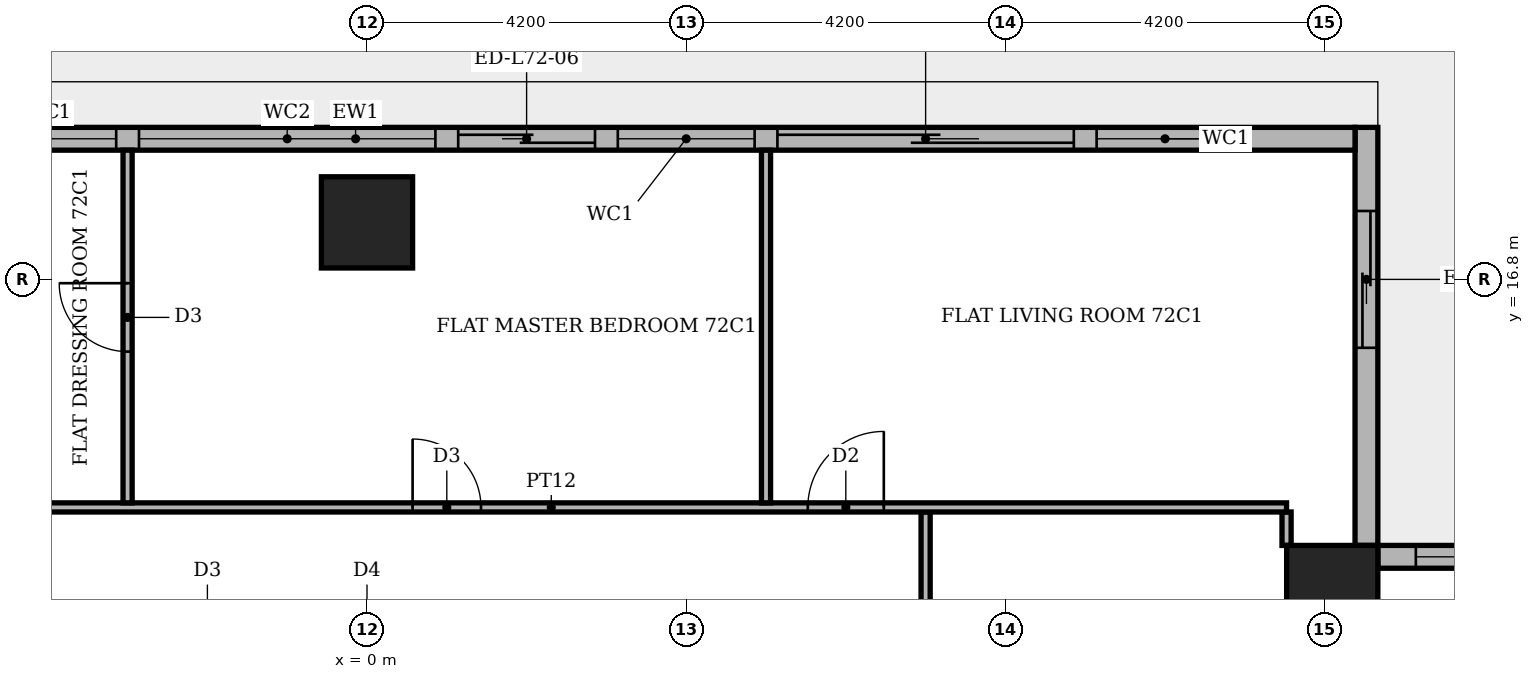
"""IFC4 building model, lengths in metres.
Left out: names, types, materials, properties, quantities, classifications, styles, units other than length and angle.
Written with IfcOpenShell. Run it as: python <this file> out.ifc"""

import sys

from ifc_helpers import new_model, si_unit, direction, frame, frame_2d, origin, origin_2d, place, context, subcontext, project, spatial, rectangle, extrude, element, fill, save


model = new_model("IFC4")
c1 = context("Model", 3, precision=1e-05, world=origin(), true_north=direction((0.0, 1.0)))
c2 = subcontext(c1, "Body", "Model", "MODEL_VIEW")
j1 = project(units=[si_unit("LENGTHUNIT", "METRE"), si_unit("PLANEANGLEUNIT", "RADIAN")], contexts=[c1])
p1 = place(None, origin())
s1 = spatial("IfcSite", under=j1, at=p1, CompositionType="ELEMENT")
p2 = place(p1, origin())
s2 = spatial("IfcBuilding", under=s1, at=p2, CompositionType="ELEMENT")
p3 = place(p2, frame((0.0, 0.0, 300.6)))
s3 = spatial("IfcBuildingStorey", under=s2, at=p3, CompositionType="ELEMENT", Elevation=300.6)
for number, where, z_axis, x_axis in (
    (1, (12.7, 12.7, -0.35), (0.0, 0.0, 1.0), (1.0, 0.0, 0.0)),
    (2, (0.0, 17.55, -0.35), (0.0, 0.0, 1.0), (1.0, 0.0, 0.0)),
):
    element("IfcColumn", number, at=place(p3, frame(where, z_axis=z_axis, x_axis=x_axis)), inside=s3, PredefinedType="COLUMN", context=c2, shape_type="SweptSolid", body=[
        extrude(rectangle(XDim=1.2, YDim=1.2, at=origin_2d()), origin(), (0.0, 0.0, 1.0), 4.25),
    ])
p4 = place(p3, frame((18.5, 13.15, 0.0), z_axis=(0.0, 0.0, 1.0), x_axis=(-1.0, 0.0, 0.0)))
e3 = element("IfcWall", 3, at=p4, inside=s3, PredefinedType="STANDARD", context=c2, shape_type="SweptSolid", body=[
    extrude(rectangle(XDim=5.2, YDim=0.3, at=frame_2d((2.6, 0.0))), origin(), (0.0, 0.0, 1.0), 3.55),
])
p5 = place(p4, frame((0.8, 0.0, 0.6)))
e4 = element("IfcOpeningElement", 4, at=p5, cuts=e3, PredefinedType="OPENING", context=c2, shape_type="SweptSolid", body=[
    extrude(rectangle(XDim=3.9, YDim=2.4, at=frame_2d((1.95, 1.2))), frame((0.0, 0.16, 0.0), z_axis=(0.0, -1.0, 0.0), x_axis=(1.0, 0.0, 0.0)), (0.0, 0.0, 1.0), 0.32),
])
p6 = place(p3, frame((13.15, 13.3, 0.0), z_axis=(0.0, 0.0, 1.0), x_axis=(0.0, 1.0, 0.0)))
e5 = element("IfcWall", 5, at=p6, inside=s3, PredefinedType="STANDARD", context=c2, shape_type="SweptSolid", body=[
    extrude(rectangle(XDim=5.5, YDim=0.3, at=frame_2d((2.75, 0.0))), origin(), (0.0, 0.0, 1.0), 3.55),
])
p7 = place(p6, frame((2.6, 0.0, 0.0)))
e6 = element("IfcOpeningElement", 6, at=p7, cuts=e5, PredefinedType="OPENING", context=c2, shape_type="SweptSolid", body=[
    extrude(rectangle(XDim=1.8, YDim=2.4, at=frame_2d((0.9, 1.2))), frame((0.0, 0.16, 0.0), z_axis=(0.0, -1.0, 0.0), x_axis=(1.0, 0.0, 0.0)), (0.0, 0.0, 1.0), 0.32),
])
p8 = place(p3, frame((13.0, 18.65, 0.0), z_axis=(0.0, 0.0, 1.0), x_axis=(-1.0, 0.0, 0.0)))
e7 = element("IfcWall", 7, at=p8, inside=s3, PredefinedType="STANDARD", context=c2, shape_type="SweptSolid", body=[
    extrude(rectangle(XDim=26.3, YDim=0.3, at=frame_2d((13.15, 0.0))), origin(), (0.0, 0.0, 1.0), 3.55),
])
p9 = place(p8, frame((1.6, 0.0, 0.6)))
e8 = element("IfcOpeningElement", 8, at=p9, cuts=e7, PredefinedType="OPENING", context=c2, shape_type="SweptSolid", body=[
    extrude(rectangle(XDim=1.8, YDim=2.4, at=frame_2d((0.9, 1.2))), frame((0.0, 0.16, 0.0), z_axis=(0.0, -1.0, 0.0), x_axis=(1.0, 0.0, 0.0)), (0.0, 0.0, 1.0), 0.32),
])
p10 = place(p8, frame((3.7, 0.0, 0.0)))
e9 = element("IfcOpeningElement", 9, at=p10, cuts=e7, PredefinedType="OPENING", context=c2, shape_type="SweptSolid", body=[
    extrude(rectangle(XDim=3.9, YDim=2.4, at=frame_2d((1.95, 1.2))), frame((0.0, 0.16, 0.0), z_axis=(0.0, -1.0, 0.0), x_axis=(1.0, 0.0, 0.0)), (0.0, 0.0, 1.0), 0.32),
])
p11 = place(p8, frame((7.9, 0.0, 0.6)))
e10 = element("IfcOpeningElement", 10, at=p11, cuts=e7, PredefinedType="OPENING", context=c2, shape_type="SweptSolid", body=[
    extrude(rectangle(XDim=1.8, YDim=2.4, at=frame_2d((0.9, 1.2))), frame((0.0, 0.16, 0.0), z_axis=(0.0, -1.0, 0.0), x_axis=(1.0, 0.0, 0.0)), (0.0, 0.0, 1.0), 0.32),
])
p12 = place(p8, frame((10.0, 0.0, 0.0)))
e11 = element("IfcOpeningElement", 11, at=p12, cuts=e7, PredefinedType="OPENING", context=c2, shape_type="SweptSolid", body=[
    extrude(rectangle(XDim=1.8, YDim=2.4, at=frame_2d((0.9, 1.2))), frame((0.0, 0.16, 0.0), z_axis=(0.0, -1.0, 0.0), x_axis=(1.0, 0.0, 0.0)), (0.0, 0.0, 1.0), 0.32),
])
p13 = place(p8, frame((12.1, 0.0, 0.6)))
e12 = element("IfcOpeningElement", 12, at=p13, cuts=e7, PredefinedType="OPENING", context=c2, shape_type="SweptSolid", body=[
    extrude(rectangle(XDim=3.9, YDim=2.4, at=frame_2d((1.95, 1.2))), frame((0.0, 0.16, 0.0), z_axis=(0.0, -1.0, 0.0), x_axis=(1.0, 0.0, 0.0)), (0.0, 0.0, 1.0), 0.32),
])
p14 = place(p8, frame((16.3, 0.0, 0.6)))
e13 = element("IfcOpeningElement", 13, at=p14, cuts=e7, PredefinedType="OPENING", context=c2, shape_type="SweptSolid", body=[
    extrude(rectangle(XDim=1.8, YDim=2.4, at=frame_2d((0.9, 1.2))), frame((0.0, 0.16, 0.0), z_axis=(0.0, -1.0, 0.0), x_axis=(1.0, 0.0, 0.0)), (0.0, 0.0, 1.0), 0.32),
])
p15 = place(p8, frame((18.4, 0.0, 0.6)))
e14 = element("IfcOpeningElement", 14, at=p15, cuts=e7, PredefinedType="OPENING", context=c2, shape_type="SweptSolid", body=[
    extrude(rectangle(XDim=1.8, YDim=2.4, at=frame_2d((0.9, 1.2))), frame((0.0, 0.16, 0.0), z_axis=(0.0, -1.0, 0.0), x_axis=(1.0, 0.0, 0.0)), (0.0, 0.0, 1.0), 0.32),
])
p16 = place(p8, frame((20.5, 0.0, 0.6)))
e15 = element("IfcOpeningElement", 15, at=p16, cuts=e7, PredefinedType="OPENING", context=c2, shape_type="SweptSolid", body=[
    extrude(rectangle(XDim=3.9, YDim=2.4, at=frame_2d((1.95, 1.2))), frame((0.0, 0.16, 0.0), z_axis=(0.0, -1.0, 0.0), x_axis=(1.0, 0.0, 0.0)), (0.0, 0.0, 1.0), 0.32),
])
p17 = place(p3, frame((7.35, 7.45, 0.0), z_axis=(0.0, 0.0, 1.0), x_axis=(0.0, 1.0, 0.0)))
e16 = element("IfcWall", 16, at=p17, inside=s3, PredefinedType="PARTITIONING", context=c2, shape_type="SweptSolid", body=[
    extrude(rectangle(XDim=6.29, YDim=0.12, at=frame_2d((3.145, 0.0))), origin(), (0.0, 0.0, 1.0), 3.55),
])
p18 = place(p17, frame((2.675, 0.0, 0.0)))
e17 = element("IfcOpeningElement", 17, at=p18, cuts=e16, PredefinedType="OPENING", context=c2, shape_type="SweptSolid", body=[
    extrude(rectangle(XDim=0.9, YDim=2.1, at=frame_2d((0.45, 1.05))), frame((0.0, 0.07, 0.0), z_axis=(0.0, -1.0, 0.0), x_axis=(1.0, 0.0, 0.0)), (0.0, 0.0, 1.0), 0.14),
])
p19 = place(p3, frame((12.099, 13.3, 0.0), z_axis=(0.0, 0.0, 1.0), x_axis=(0.0, 1.0, 0.0)))
e18 = element("IfcWall", 18, at=p19, inside=s3, PredefinedType="PARTITIONING", context=c2, shape_type="SweptSolid", body=[
    extrude(rectangle(XDim=0.44, YDim=0.12, at=frame_2d((0.22, 0.0))), origin(), (0.0, 0.0, 1.0), 3.55),
])
p20 = place(p3, frame((-7.25, 13.8, 0.0), z_axis=(0.0, 0.0, 1.0), x_axis=(1.0, 0.0, 0.0)))
e19 = element("IfcWall", 19, at=p20, inside=s3, PredefinedType="PARTITIONING", context=c2, shape_type="SweptSolid", body=[
    extrude(rectangle(XDim=19.349, YDim=0.12, at=frame_2d((9.675, 0.0))), origin(), (0.0, 0.0, 1.0), 3.55),
])
p21 = place(p20, frame((13.05, 0.0, 0.0)))
e20 = element("IfcOpeningElement", 20, at=p21, cuts=e19, PredefinedType="OPENING", context=c2, shape_type="SweptSolid", body=[
    extrude(rectangle(XDim=1.0, YDim=2.1, at=frame_2d((0.5, 1.05))), frame((0.0, 0.07, 0.0), z_axis=(0.0, -1.0, 0.0), x_axis=(1.0, 0.0, 0.0)), (0.0, 0.0, 1.0), 0.14),
])
p22 = place(p20, frame((7.85, 0.0, 0.0)))
e21 = element("IfcOpeningElement", 21, at=p22, cuts=e19, PredefinedType="OPENING", context=c2, shape_type="SweptSolid", body=[
    extrude(rectangle(XDim=0.9, YDim=2.1, at=frame_2d((0.45, 1.05))), frame((0.0, 0.07, 0.0), z_axis=(0.0, -1.0, 0.0), x_axis=(1.0, 0.0, 0.0)), (0.0, 0.0, 1.0), 0.14),
])
p23 = place(p3, frame((-3.15, 13.86, 0.0), z_axis=(0.0, 0.0, 1.0), x_axis=(0.0, 1.0, 0.0)))
e22 = element("IfcWall", 22, at=p23, inside=s3, PredefinedType="PARTITIONING", context=c2, shape_type="SweptSolid", body=[
    extrude(rectangle(XDim=4.64, YDim=0.12, at=frame_2d((2.32, 0.0))), origin(), (0.0, 0.0, 1.0), 3.55),
])
p24 = place(p23, frame((1.99, 0.0, 0.0)))
e23 = element("IfcOpeningElement", 23, at=p24, cuts=e22, PredefinedType="OPENING", context=c2, shape_type="SweptSolid", body=[
    extrude(rectangle(XDim=0.9, YDim=2.1, at=frame_2d((0.45, 1.05))), frame((0.0, 0.07, 0.0), z_axis=(0.0, -1.0, 0.0), x_axis=(1.0, 0.0, 0.0)), (0.0, 0.0, 1.0), 0.14),
])
p25 = place(p3, frame((5.25, 13.86, 0.0), z_axis=(0.0, 0.0, 1.0), x_axis=(0.0, 1.0, 0.0)))
e24 = element("IfcWall", 24, at=p25, inside=s3, PredefinedType="PARTITIONING", context=c2, shape_type="SweptSolid", body=[
    extrude(rectangle(XDim=4.64, YDim=0.12, at=frame_2d((2.32, 0.0))), origin(), (0.0, 0.0, 1.0), 3.55),
])
p26 = place(p5, origin())
e25 = element("IfcWindow", 25, at=p26, inside=s3, PartitioningType="SINGLE_PANEL", PredefinedType="WINDOW", context=c2, shape_type="SweptSolid", body=[
    extrude(rectangle(XDim=3.9, YDim=2.4, at=frame_2d((1.95, 1.2))), frame((0.0, 0.03, 0.0), z_axis=(0.0, -1.0, 0.0), x_axis=(1.0, 0.0, 0.0)), (0.0, 0.0, 1.0), 0.06),
])
fill(e4, e25)
p27 = place(p7, origin())
e26 = element("IfcDoor", 26, at=p27, inside=s3, OperationType="SLIDING_TO_LEFT", PredefinedType="DOOR", context=c2, shape_type="SweptSolid", body=[
    extrude(rectangle(XDim=1.8, YDim=2.4, at=frame_2d((0.9, 1.2))), frame((0.0, 0.025, 0.0), z_axis=(0.0, -1.0, 0.0), x_axis=(1.0, 0.0, 0.0)), (0.0, 0.0, 1.0), 0.05),
])
fill(e6, e26)
p28 = place(p9, origin())
e27 = element("IfcWindow", 27, at=p28, inside=s3, PartitioningType="SINGLE_PANEL", PredefinedType="WINDOW", context=c2, shape_type="SweptSolid", body=[
    extrude(rectangle(XDim=1.8, YDim=2.4, at=frame_2d((0.9, 1.2))), frame((0.0, 0.03, 0.0), z_axis=(0.0, -1.0, 0.0), x_axis=(1.0, 0.0, 0.0)), (0.0, 0.0, 1.0), 0.06),
])
fill(e8, e27)
p29 = place(p10, origin())
e28 = element("IfcDoor", 28, at=p29, inside=s3, OperationType="SLIDING_TO_LEFT", PredefinedType="DOOR", context=c2, shape_type="SweptSolid", body=[
    extrude(rectangle(XDim=3.9, YDim=2.4, at=frame_2d((1.95, 1.2))), frame((0.0, 0.025, 0.0), z_axis=(0.0, -1.0, 0.0), x_axis=(1.0, 0.0, 0.0)), (0.0, 0.0, 1.0), 0.05),
])
fill(e9, e28)
p30 = place(p11, origin())
e29 = element("IfcWindow", 29, at=p30, inside=s3, PartitioningType="SINGLE_PANEL", PredefinedType="WINDOW", context=c2, shape_type="SweptSolid", body=[
    extrude(rectangle(XDim=1.8, YDim=2.4, at=frame_2d((0.9, 1.2))), frame((0.0, 0.03, 0.0), z_axis=(0.0, -1.0, 0.0), x_axis=(1.0, 0.0, 0.0)), (0.0, 0.0, 1.0), 0.06),
])
fill(e10, e29)
p31 = place(p12, origin())
e30 = element("IfcDoor", 30, at=p31, inside=s3, OperationType="SLIDING_TO_RIGHT", PredefinedType="DOOR", context=c2, shape_type="SweptSolid", body=[
    extrude(rectangle(XDim=1.8, YDim=2.4, at=frame_2d((0.9, 1.2))), frame((0.0, 0.025, 0.0), z_axis=(0.0, -1.0, 0.0), x_axis=(1.0, 0.0, 0.0)), (0.0, 0.0, 1.0), 0.05),
])
fill(e11, e30)
p32 = place(p13, origin())
e31 = element("IfcWindow", 31, at=p32, inside=s3, PartitioningType="SINGLE_PANEL", PredefinedType="WINDOW", context=c2, shape_type="SweptSolid", body=[
    extrude(rectangle(XDim=3.9, YDim=2.4, at=frame_2d((1.95, 1.2))), frame((0.0, 0.03, 0.0), z_axis=(0.0, -1.0, 0.0), x_axis=(1.0, 0.0, 0.0)), (0.0, 0.0, 1.0), 0.06),
])
fill(e12, e31)
p33 = place(p14, origin())
e32 = element("IfcWindow", 32, at=p33, inside=s3, PartitioningType="SINGLE_PANEL", PredefinedType="WINDOW", context=c2, shape_type="SweptSolid", body=[
    extrude(rectangle(XDim=1.8, YDim=2.4, at=frame_2d((0.9, 1.2))), frame((0.0, 0.03, 0.0), z_axis=(0.0, -1.0, 0.0), x_axis=(1.0, 0.0, 0.0)), (0.0, 0.0, 1.0), 0.06),
])
fill(e13, e32)
p34 = place(p21, origin())
e33 = element("IfcDoor", 33, at=p34, inside=s3, OperationType="SINGLE_SWING_RIGHT", PredefinedType="DOOR", context=c2, shape_type="SweptSolid", body=[
    extrude(rectangle(XDim=1.0, YDim=2.1, at=frame_2d((0.5, 1.05))), frame((0.0, 0.025, 0.0), z_axis=(0.0, -1.0, 0.0), x_axis=(1.0, 0.0, 0.0)), (0.0, 0.0, 1.0), 0.05),
])
fill(e20, e33)
p35 = place(p22, origin())
e34 = element("IfcDoor", 34, at=p35, inside=s3, OperationType="SINGLE_SWING_LEFT", PredefinedType="DOOR", context=c2, shape_type="SweptSolid", body=[
    extrude(rectangle(XDim=0.9, YDim=2.1, at=frame_2d((0.45, 1.05))), frame((0.0, 0.025, 0.0), z_axis=(0.0, -1.0, 0.0), x_axis=(1.0, 0.0, 0.0)), (0.0, 0.0, 1.0), 0.05),
])
fill(e21, e34)
p36 = place(p24, origin())
e35 = element("IfcDoor", 35, at=p36, inside=s3, OperationType="SINGLE_SWING_RIGHT", PredefinedType="DOOR", context=c2, shape_type="SweptSolid", body=[
    extrude(rectangle(XDim=0.9, YDim=2.1, at=frame_2d((0.45, 1.05))), frame((0.0, 0.025, 0.0), z_axis=(0.0, -1.0, 0.0), x_axis=(1.0, 0.0, 0.0)), (0.0, 0.0, 1.0), 0.05),
])
fill(e23, e35)
save(model, sys.argv[1])
